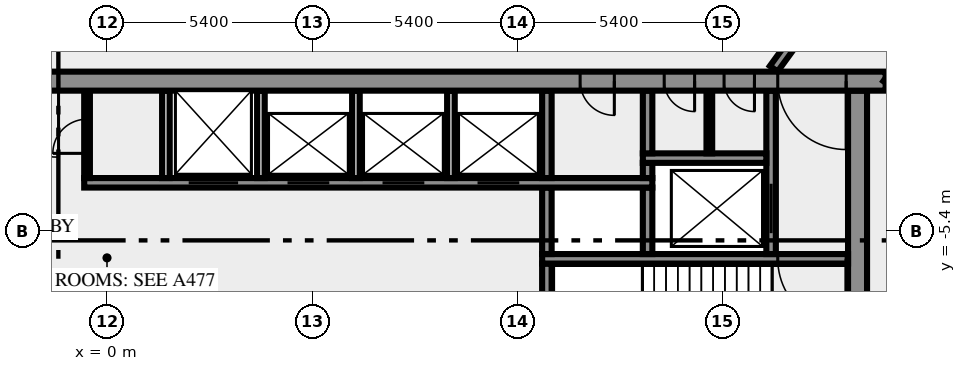
"""IFC4 building model, lengths in metres.
Left out: names, types, materials, properties, quantities, classifications, styles, units other than length and angle.
Written with IfcOpenShell. Run it as: python <this file> out.ifc"""

import sys

from ifc_helpers import new_model, si_unit, direction, frame, frame_2d, origin, place, context, subcontext, project, spatial, rectangle, extrude, element, fill, save


model = new_model("IFC4")
c1 = context("Model", 3, precision=1e-05, world=origin(), true_north=direction((0.0, 1.0)))
c2 = subcontext(c1, "Body", "Model", "MODEL_VIEW")
j1 = project(units=[si_unit("LENGTHUNIT", "METRE"), si_unit("PLANEANGLEUNIT", "RADIAN")], contexts=[c1])
p1 = place(None, origin())
s1 = spatial("IfcSite", under=j1, at=p1, CompositionType="ELEMENT")
p2 = place(p1, origin())
s2 = spatial("IfcBuilding", under=s1, at=p2, CompositionType="ELEMENT")
p3 = place(p2, frame((0.0, 0.0, 139.0)))
s3 = spatial("IfcBuildingStorey", under=s2, at=p3, CompositionType="ELEMENT", Elevation=139.0)
p4 = place(p3, frame((19.75, -10.5, 0.0), z_axis=(0.0, 0.0, 1.0), x_axis=(0.0, 1.0, 0.0)))
e1 = element("IfcWall", 1, at=p4, inside=s3, PredefinedType="SHEAR", context=c2, shape_type="SweptSolid", body=[
    extrude(rectangle(XDim=8.8, YDim=0.5, at=frame_2d((4.4, 0.0))), origin(), (0.0, 0.0, 1.0), 4.65),
])
p5 = place(p3, frame((11.575, -7.25, 0.0), z_axis=(0.0, 0.0, 1.0), x_axis=(0.0, 1.0, 0.0)))
e2 = element("IfcWall", 2, at=p5, inside=s3, PredefinedType="SHEAR", context=c2, shape_type="SweptSolid", body=[
    extrude(rectangle(XDim=1.0, YDim=0.25, at=frame_2d((0.5, 0.0))), origin(), (0.0, 0.0, 1.0), 4.65),
])
p6 = place(p3, frame((19.5, -6.125, 0.0), z_axis=(0.0, 0.0, 1.0), x_axis=(-1.0, 0.0, 0.0)))
e3 = element("IfcWall", 3, at=p6, inside=s3, PredefinedType="SHEAR", context=c2, shape_type="SweptSolid", body=[
    extrude(rectangle(XDim=8.05, YDim=0.25, at=frame_2d((4.025, 0.0))), origin(), (0.0, 0.0, 1.0), 4.65),
])
p7 = place(p6, frame((0.05, 0.0, 0.0)))
e4 = element("IfcOpeningElement", 4, at=p7, cuts=e3, PredefinedType="OPENING", context=c2, shape_type="SweptSolid", body=[
    extrude(rectangle(XDim=1.8, YDim=2.1, at=frame_2d((0.9, 1.05))), frame((0.0, 0.135, 0.0), z_axis=(0.0, -1.0, 0.0), x_axis=(1.0, 0.0, 0.0)), (0.0, 0.0, 1.0), 0.27),
])
for number, where, z_axis, x_axis in (
    (5, (11.575, -6.0, 0.0), (0.0, 0.0, 1.0), (0.0, 1.0, 0.0)),
    (6, (14.225, -6.0, 0.0), (0.0, 0.0, 1.0), (0.0, 1.0, 0.0)),
):
    element("IfcWall", number, at=place(p3, frame(where, z_axis=z_axis, x_axis=x_axis)), inside=s3, PredefinedType="SHEAR", context=c2, shape_type="SweptSolid", body=[
        extrude(rectangle(XDim=1.75, YDim=0.25, at=frame_2d((0.875, 0.0))), origin(), (0.0, 0.0, 1.0), 4.65),
    ])
p8 = place(p3, frame((17.475, -6.0, 0.0), z_axis=(0.0, 0.0, 1.0), x_axis=(0.0, 1.0, 0.0)))
e7 = element("IfcWall", 7, at=p8, inside=s3, PredefinedType="SHEAR", context=c2, shape_type="SweptSolid", body=[
    extrude(rectangle(XDim=4.3, YDim=0.25, at=frame_2d((2.15, 0.0))), origin(), (0.0, 0.0, 1.0), 4.65),
])
p9 = place(p8, frame((0.55, 0.0, 0.0)))
e8 = element("IfcOpeningElement", 8, at=p9, cuts=e7, PredefinedType="OPENING", context=c2, shape_type="SweptSolid", body=[
    extrude(rectangle(XDim=1.3, YDim=2.1, at=frame_2d((0.65, 1.05))), frame((0.0, 0.135, 0.0), z_axis=(0.0, -1.0, 0.0), x_axis=(1.0, 0.0, 0.0)), (0.0, 0.0, 1.0), 0.27),
])
p10 = place(p3, frame((-0.6, -4.125, 0.0), z_axis=(0.0, 0.0, 1.0), x_axis=(1.0, 0.0, 0.0)))
e9 = element("IfcWall", 9, at=p10, inside=s3, PredefinedType="SHEAR", context=c2, shape_type="SweptSolid", body=[
    extrude(rectangle(XDim=14.95, YDim=0.25, at=frame_2d((7.475, 0.0))), origin(), (0.0, 0.0, 1.0), 4.65),
])
p11 = place(p10, frame((2.75, 0.0, 0.0)))
e10 = element("IfcOpeningElement", 10, at=p11, cuts=e9, PredefinedType="OPENING", context=c2, shape_type="SweptSolid", body=[
    extrude(rectangle(XDim=1.3, YDim=2.1, at=frame_2d((0.65, 1.05))), frame((0.0, 0.135, 0.0), z_axis=(0.0, -1.0, 0.0), x_axis=(1.0, 0.0, 0.0)), (0.0, 0.0, 1.0), 0.27),
])
p12 = place(p10, frame((5.35, 0.0, 0.0)))
e11 = element("IfcOpeningElement", 11, at=p12, cuts=e9, PredefinedType="OPENING", context=c2, shape_type="SweptSolid", body=[
    extrude(rectangle(XDim=1.1, YDim=2.1, at=frame_2d((0.55, 1.05))), frame((0.0, 0.135, 0.0), z_axis=(0.0, -1.0, 0.0), x_axis=(1.0, 0.0, 0.0)), (0.0, 0.0, 1.0), 0.27),
])
p13 = place(p10, frame((7.85, 0.0, 0.0)))
e12 = element("IfcOpeningElement", 12, at=p13, cuts=e9, PredefinedType="OPENING", context=c2, shape_type="SweptSolid", body=[
    extrude(rectangle(XDim=1.1, YDim=2.1, at=frame_2d((0.55, 1.05))), frame((0.0, 0.135, 0.0), z_axis=(0.0, -1.0, 0.0), x_axis=(1.0, 0.0, 0.0)), (0.0, 0.0, 1.0), 0.27),
])
p14 = place(p10, frame((10.35, 0.0, 0.0)))
e13 = element("IfcOpeningElement", 13, at=p14, cuts=e9, PredefinedType="OPENING", context=c2, shape_type="SweptSolid", body=[
    extrude(rectangle(XDim=1.1, YDim=2.1, at=frame_2d((0.55, 1.05))), frame((0.0, 0.135, 0.0), z_axis=(0.0, -1.0, 0.0), x_axis=(1.0, 0.0, 0.0)), (0.0, 0.0, 1.0), 0.27),
])
p15 = place(p3, frame((-0.525, -4.0, 0.0), z_axis=(0.0, 0.0, 1.0), x_axis=(0.0, 1.0, 0.0)))
e14 = element("IfcWall", 14, at=p15, inside=s3, PredefinedType="PARTITIONING", context=c2, shape_type="SweptSolid", body=[
    extrude(rectangle(XDim=2.3, YDim=0.15, at=frame_2d((1.15, 0.0))), origin(), (0.0, 0.0, 1.0), 4.65),
])
p16 = place(p15, frame((0.65, 0.0, 0.0)))
e15 = element("IfcOpeningElement", 15, at=p16, cuts=e14, PredefinedType="OPENING", context=c2, shape_type="SweptSolid", body=[
    extrude(rectangle(XDim=0.9, YDim=2.1, at=frame_2d((0.45, 1.05))), frame((0.0, 0.085, 0.0), z_axis=(0.0, -1.0, 0.0), x_axis=(1.0, 0.0, 0.0)), (0.0, 0.0, 1.0), 0.17),
])
for number, where, z_axis, x_axis in (
    (16, (1.55, -4.0, 0.0), (0.0, 0.0, 1.0), (0.0, 1.0, 0.0)),
    (17, (4.05, -4.0, 0.0), (0.0, 0.0, 1.0), (0.0, 1.0, 0.0)),
    (18, (6.55, -4.0, 0.0), (0.0, 0.0, 1.0), (0.0, 1.0, 0.0)),
    (19, (9.05, -4.0, 0.0), (0.0, 0.0, 1.0), (0.0, 1.0, 0.0)),
):
    element("IfcWall", number, at=place(p3, frame(where, z_axis=z_axis, x_axis=x_axis)), inside=s3, PredefinedType="SOLIDWALL", context=c2, shape_type="SweptSolid", body=[
        extrude(rectangle(XDim=2.3, YDim=0.2, at=frame_2d((1.15, 0.0))), origin(), (0.0, 0.0, 1.0), 4.65),
    ])
p17 = place(p3, frame((11.575, -4.0, 0.0), z_axis=(0.0, 0.0, 1.0), x_axis=(0.0, 1.0, 0.0)))
e20 = element("IfcWall", 20, at=p17, inside=s3, PredefinedType="SHEAR", context=c2, shape_type="SweptSolid", body=[
    extrude(rectangle(XDim=2.3, YDim=0.25, at=frame_2d((1.15, 0.0))), origin(), (0.0, 0.0, 1.0), 4.65),
])
p18 = place(p3, frame((14.225, -4.0, 0.0), z_axis=(0.0, 0.0, 1.0), x_axis=(0.0, 1.0, 0.0)))
e21 = element("IfcWall", 21, at=p18, inside=s3, PredefinedType="SHEAR", context=c2, shape_type="SweptSolid", body=[
    extrude(rectangle(XDim=0.4, YDim=0.25, at=frame_2d((0.2, 0.0))), origin(), (0.0, 0.0, 1.0), 4.65),
])
p19 = place(p3, frame((14.1, -3.475, 0.0), z_axis=(0.0, 0.0, 1.0), x_axis=(1.0, 0.0, 0.0)))
e22 = element("IfcWall", 22, at=p19, inside=s3, PredefinedType="SHEAR", context=c2, shape_type="SweptSolid", body=[
    extrude(rectangle(XDim=3.25, YDim=0.25, at=frame_2d((1.625, 0.0))), origin(), (0.0, 0.0, 1.0), 4.65),
])
p20 = place(p3, frame((14.225, -3.35, 0.0), z_axis=(0.0, 0.0, 1.0), x_axis=(0.0, 1.0, 0.0)))
e23 = element("IfcWall", 23, at=p20, inside=s3, PredefinedType="SHEAR", context=c2, shape_type="SweptSolid", body=[
    extrude(rectangle(XDim=1.65, YDim=0.25, at=frame_2d((0.825, 0.0))), origin(), (0.0, 0.0, 1.0), 4.65),
])
p21 = place(p3, frame((15.85, -3.35, 0.0), z_axis=(0.0, 0.0, 1.0), x_axis=(0.0, 1.0, 0.0)))
e24 = element("IfcWall", 24, at=p21, inside=s3, PredefinedType="PARTITIONING", context=c2, shape_type="SweptSolid", body=[
    extrude(rectangle(XDim=1.65, YDim=0.15, at=frame_2d((0.825, 0.0))), origin(), (0.0, 0.0, 1.0), 4.65),
])
p22 = place(p3, frame((20.49, -1.45, 0.0), z_axis=(0.0, 0.0, 1.0), x_axis=(-1.0, 0.0, 0.0)))
e25 = element("IfcWall", 25, at=p22, inside=s3, PredefinedType="SHEAR", context=c2, shape_type="SweptSolid", body=[
    extrude(rectangle(XDim=40.98, YDim=0.5, at=frame_2d((20.49, 0.0))), origin(), (0.0, 0.0, 1.0), 4.65),
])
p23 = place(p22, frame((38.14, 0.0, 0.0)))
e26 = element("IfcOpeningElement", 26, at=p23, cuts=e25, PredefinedType="OPENING", context=c2, shape_type="SweptSolid", body=[
    extrude(rectangle(XDim=1.8, YDim=2.1, at=frame_2d((0.9, 1.05))), frame((0.0, 0.26, 0.0), z_axis=(0.0, -1.0, 0.0), x_axis=(1.0, 0.0, 0.0)), (0.0, 0.0, 1.0), 0.52),
])
p24 = place(p22, frame((35.89, 0.0, 0.0)))
e27 = element("IfcOpeningElement", 27, at=p24, cuts=e25, PredefinedType="OPENING", context=c2, shape_type="SweptSolid", body=[
    extrude(rectangle(XDim=0.9, YDim=2.1, at=frame_2d((0.45, 1.05))), frame((0.0, 0.26, 0.0), z_axis=(0.0, -1.0, 0.0), x_axis=(1.0, 0.0, 0.0)), (0.0, 0.0, 1.0), 0.52),
])
p25 = place(p22, frame((32.94, 0.0, 0.0)))
e28 = element("IfcOpeningElement", 28, at=p25, cuts=e25, PredefinedType="OPENING", context=c2, shape_type="SweptSolid", body=[
    extrude(rectangle(XDim=0.9, YDim=2.1, at=frame_2d((0.45, 1.05))), frame((0.0, 0.26, 0.0), z_axis=(0.0, -1.0, 0.0), x_axis=(1.0, 0.0, 0.0)), (0.0, 0.0, 1.0), 0.52),
])
p26 = place(p22, frame((21.765, 0.0, 0.0)))
e29 = element("IfcOpeningElement", 29, at=p26, cuts=e25, PredefinedType="OPENING", context=c2, shape_type="SweptSolid", body=[
    extrude(rectangle(XDim=2.0, YDim=2.1, at=frame_2d((1.0, 1.05))), frame((0.0, 0.26, 0.0), z_axis=(0.0, -1.0, 0.0), x_axis=(1.0, 0.0, 0.0)), (0.0, 0.0, 1.0), 0.52),
])
p27 = place(p22, frame((7.14, 0.0, 0.0)))
e30 = element("IfcOpeningElement", 30, at=p27, cuts=e25, PredefinedType="OPENING", context=c2, shape_type="SweptSolid", body=[
    extrude(rectangle(XDim=0.9, YDim=2.1, at=frame_2d((0.45, 1.05))), frame((0.0, 0.26, 0.0), z_axis=(0.0, -1.0, 0.0), x_axis=(1.0, 0.0, 0.0)), (0.0, 0.0, 1.0), 0.52),
])
p28 = place(p22, frame((5.028, 0.0, 0.0)))
e31 = element("IfcOpeningElement", 31, at=p28, cuts=e25, PredefinedType="OPENING", context=c2, shape_type="SweptSolid", body=[
    extrude(rectangle(XDim=0.8, YDim=2.1, at=frame_2d((0.4, 1.05))), frame((0.0, 0.26, 0.0), z_axis=(0.0, -1.0, 0.0), x_axis=(1.0, 0.0, 0.0)), (0.0, 0.0, 1.0), 0.52),
])
p29 = place(p22, frame((3.452, 0.0, 0.0)))
e32 = element("IfcOpeningElement", 32, at=p29, cuts=e25, PredefinedType="OPENING", context=c2, shape_type="SweptSolid", body=[
    extrude(rectangle(XDim=0.8, YDim=2.1, at=frame_2d((0.4, 1.05))), frame((0.0, 0.26, 0.0), z_axis=(0.0, -1.0, 0.0), x_axis=(1.0, 0.0, 0.0)), (0.0, 0.0, 1.0), 0.52),
])
p30 = place(p22, frame((1.04, 0.0, 0.0)))
e33 = element("IfcOpeningElement", 33, at=p30, cuts=e25, PredefinedType="OPENING", context=c2, shape_type="SweptSolid", body=[
    extrude(rectangle(XDim=1.8, YDim=2.1, at=frame_2d((0.9, 1.05))), frame((0.0, 0.26, 0.0), z_axis=(0.0, -1.0, 0.0), x_axis=(1.0, 0.0, 0.0)), (0.0, 0.0, 1.0), 0.52),
])
p31 = place(p3, frame((40.463, 25.911, 0.0), z_axis=(0.0, 0.0, 1.0), x_axis=(-0.587781654618, -0.809019608226, 0.0)))
e34 = element("IfcWall", 34, at=p31, inside=s3, PredefinedType="SOLIDWALL", context=c2, shape_type="SweptSolid", body=[
    extrude(rectangle(XDim=33.911, YDim=0.25, at=frame_2d((16.956, 0.0))), origin(), (0.0, 0.0, 1.0), 4.65),
])
p32 = place(p31, frame((25.137, 0.0, 0.0)))
e35 = element("IfcOpeningElement", 35, at=p32, cuts=e34, PredefinedType="OPENING", context=c2, shape_type="SweptSolid", body=[
    extrude(rectangle(XDim=1.8, YDim=2.1, at=frame_2d((0.9, 1.05))), frame((0.0, 0.135, 0.0), z_axis=(0.0, -1.0, 0.0), x_axis=(1.0, 0.0, 0.0)), (0.0, 0.0, 1.0), 0.27),
])
p33 = place(p31, frame((13.296, 0.0, 0.0)))
e36 = element("IfcOpeningElement", 36, at=p33, cuts=e34, PredefinedType="OPENING", context=c2, shape_type="SweptSolid", body=[
    extrude(rectangle(XDim=0.9, YDim=2.1, at=frame_2d((0.45, 1.05))), frame((0.0, 0.135, 0.0), z_axis=(0.0, -1.0, 0.0), x_axis=(1.0, 0.0, 0.0)), (0.0, 0.0, 1.0), 0.27),
])
p34 = place(p31, frame((0.441, 0.0, 0.0)))
e37 = element("IfcOpeningElement", 37, at=p34, cuts=e34, PredefinedType="OPENING", context=c2, shape_type="SweptSolid", body=[
    extrude(rectangle(XDim=0.9, YDim=2.1, at=frame_2d((0.45, 1.05))), frame((0.0, 0.135, 0.0), z_axis=(0.0, -1.0, 0.0), x_axis=(1.0, 0.0, 0.0)), (0.0, 0.0, 1.0), 0.27),
])
p35 = place(p3, frame((17.545, -1.125, 0.0), z_axis=(0.0, 0.0, 1.0), x_axis=(0.587788021768, 0.809014982226, 0.0)))
e38 = element("IfcWall", 38, at=p35, inside=s3, PredefinedType="SOLIDWALL", context=c2, shape_type="SweptSolid", body=[
    extrude(rectangle(XDim=35.344, YDim=0.25, at=frame_2d((17.672, 0.0))), origin(), (0.0, 0.0, 1.0), 4.65),
])
p36 = place(p35, frame((33.153, 0.0, 0.0)))
e39 = element("IfcOpeningElement", 39, at=p36, cuts=e38, PredefinedType="OPENING", context=c2, shape_type="SweptSolid", body=[
    extrude(rectangle(XDim=1.8, YDim=2.1, at=frame_2d((0.9, 1.05))), frame((0.0, 0.135, 0.0), z_axis=(0.0, -1.0, 0.0), x_axis=(1.0, 0.0, 0.0)), (0.0, 0.0, 1.0), 0.27),
])
p37 = place(p35, frame((3.392, 0.0, 0.0)))
e40 = element("IfcOpeningElement", 40, at=p37, cuts=e38, PredefinedType="OPENING", context=c2, shape_type="SweptSolid", body=[
    extrude(rectangle(XDim=1.8, YDim=2.1, at=frame_2d((0.9, 1.05))), frame((0.0, 0.135, 0.0), z_axis=(0.0, -1.0, 0.0), x_axis=(1.0, 0.0, 0.0)), (0.0, 0.0, 1.0), 0.27),
])
p38 = place(p7, origin())
e41 = element("IfcDoor", 41, at=p38, inside=s3, OperationType="DOUBLE_DOOR_SINGLE_SWING", PredefinedType="DOOR", context=c2, shape_type="SweptSolid", body=[
    extrude(rectangle(XDim=1.8, YDim=2.1, at=frame_2d((0.9, 1.05))), frame((0.0, 0.025, 0.0), z_axis=(0.0, -1.0, 0.0), x_axis=(1.0, 0.0, 0.0)), (0.0, 0.0, 1.0), 0.05),
])
fill(e4, e41)
p39 = place(p9, origin())
e42 = element("IfcDoor", 42, at=p39, inside=s3, OperationType="DOUBLE_DOOR_SLIDING", PredefinedType="DOOR", context=c2, shape_type="SweptSolid", body=[
    extrude(rectangle(XDim=1.3, YDim=2.1, at=frame_2d((0.65, 1.05))), frame((0.0, 0.025, 0.0), z_axis=(0.0, -1.0, 0.0), x_axis=(1.0, 0.0, 0.0)), (0.0, 0.0, 1.0), 0.05),
])
fill(e8, e42)
p40 = place(p11, origin())
e43 = element("IfcDoor", 43, at=p40, inside=s3, OperationType="DOUBLE_DOOR_SLIDING", PredefinedType="DOOR", context=c2, shape_type="SweptSolid", body=[
    extrude(rectangle(XDim=1.3, YDim=2.1, at=frame_2d((0.65, 1.05))), frame((0.0, 0.025, 0.0), z_axis=(0.0, -1.0, 0.0), x_axis=(1.0, 0.0, 0.0)), (0.0, 0.0, 1.0), 0.05),
])
fill(e10, e43)
p41 = place(p12, origin())
e44 = element("IfcDoor", 44, at=p41, inside=s3, OperationType="DOUBLE_DOOR_SLIDING", PredefinedType="DOOR", context=c2, shape_type="SweptSolid", body=[
    extrude(rectangle(XDim=1.1, YDim=2.1, at=frame_2d((0.55, 1.05))), frame((0.0, 0.025, 0.0), z_axis=(0.0, -1.0, 0.0), x_axis=(1.0, 0.0, 0.0)), (0.0, 0.0, 1.0), 0.05),
])
fill(e11, e44)
p42 = place(p13, origin())
e45 = element("IfcDoor", 45, at=p42, inside=s3, OperationType="DOUBLE_DOOR_SLIDING", PredefinedType="DOOR", context=c2, shape_type="SweptSolid", body=[
    extrude(rectangle(XDim=1.1, YDim=2.1, at=frame_2d((0.55, 1.05))), frame((0.0, 0.025, 0.0), z_axis=(0.0, -1.0, 0.0), x_axis=(1.0, 0.0, 0.0)), (0.0, 0.0, 1.0), 0.05),
])
fill(e12, e45)
p43 = place(p14, origin())
e46 = element("IfcDoor", 46, at=p43, inside=s3, OperationType="DOUBLE_DOOR_SLIDING", PredefinedType="DOOR", context=c2, shape_type="SweptSolid", body=[
    extrude(rectangle(XDim=1.1, YDim=2.1, at=frame_2d((0.55, 1.05))), frame((0.0, 0.025, 0.0), z_axis=(0.0, -1.0, 0.0), x_axis=(1.0, 0.0, 0.0)), (0.0, 0.0, 1.0), 0.05),
])
fill(e13, e46)
p44 = place(p16, origin())
e47 = element("IfcDoor", 47, at=p44, inside=s3, OperationType="SINGLE_SWING_LEFT", PredefinedType="DOOR", context=c2, shape_type="SweptSolid", body=[
    extrude(rectangle(XDim=0.9, YDim=2.1, at=frame_2d((0.45, 1.05))), frame((0.0, 0.025, 0.0), z_axis=(0.0, -1.0, 0.0), x_axis=(1.0, 0.0, 0.0)), (0.0, 0.0, 1.0), 0.05),
])
fill(e15, e47)
p45 = place(p26, origin())
e48 = element("IfcDoor", 48, at=p45, inside=s3, OperationType="DOUBLE_DOOR_SINGLE_SWING", PredefinedType="DOOR", context=c2, shape_type="SweptSolid", body=[
    extrude(rectangle(XDim=2.0, YDim=2.1, at=frame_2d((1.0, 1.05))), frame((0.0, 0.025, 0.0), z_axis=(0.0, -1.0, 0.0), x_axis=(1.0, 0.0, 0.0)), (0.0, 0.0, 1.0), 0.05),
])
fill(e29, e48)
p46 = place(p27, origin())
e49 = element("IfcDoor", 49, at=p46, inside=s3, OperationType="SINGLE_SWING_LEFT", PredefinedType="DOOR", context=c2, shape_type="SweptSolid", body=[
    extrude(rectangle(XDim=0.9, YDim=2.1, at=frame_2d((0.45, 1.05))), frame((0.0, 0.025, 0.0), z_axis=(0.0, -1.0, 0.0), x_axis=(1.0, 0.0, 0.0)), (0.0, 0.0, 1.0), 0.05),
])
fill(e30, e49)
p47 = place(p28, origin())
e50 = element("IfcDoor", 50, at=p47, inside=s3, OperationType="SINGLE_SWING_LEFT", PredefinedType="DOOR", context=c2, shape_type="SweptSolid", body=[
    extrude(rectangle(XDim=0.8, YDim=2.1, at=frame_2d((0.4, 1.05))), frame((0.0, 0.025, 0.0), z_axis=(0.0, -1.0, 0.0), x_axis=(1.0, 0.0, 0.0)), (0.0, 0.0, 1.0), 0.05),
])
fill(e31, e50)
p48 = place(p29, origin())
e51 = element("IfcDoor", 51, at=p48, inside=s3, OperationType="SINGLE_SWING_LEFT", PredefinedType="DOOR", context=c2, shape_type="SweptSolid", body=[
    extrude(rectangle(XDim=0.8, YDim=2.1, at=frame_2d((0.4, 1.05))), frame((0.0, 0.025, 0.0), z_axis=(0.0, -1.0, 0.0), x_axis=(1.0, 0.0, 0.0)), (0.0, 0.0, 1.0), 0.05),
])
fill(e32, e51)
p49 = place(p30, origin())
e52 = element("IfcDoor", 52, at=p49, inside=s3, OperationType="DOUBLE_DOOR_SINGLE_SWING", PredefinedType="DOOR", context=c2, shape_type="SweptSolid", body=[
    extrude(rectangle(XDim=1.8, YDim=2.1, at=frame_2d((0.9, 1.05))), frame((0.0, 0.025, 0.0), z_axis=(0.0, -1.0, 0.0), x_axis=(1.0, 0.0, 0.0)), (0.0, 0.0, 1.0), 0.05),
])
fill(e33, e52)
save(model, sys.argv[1])
